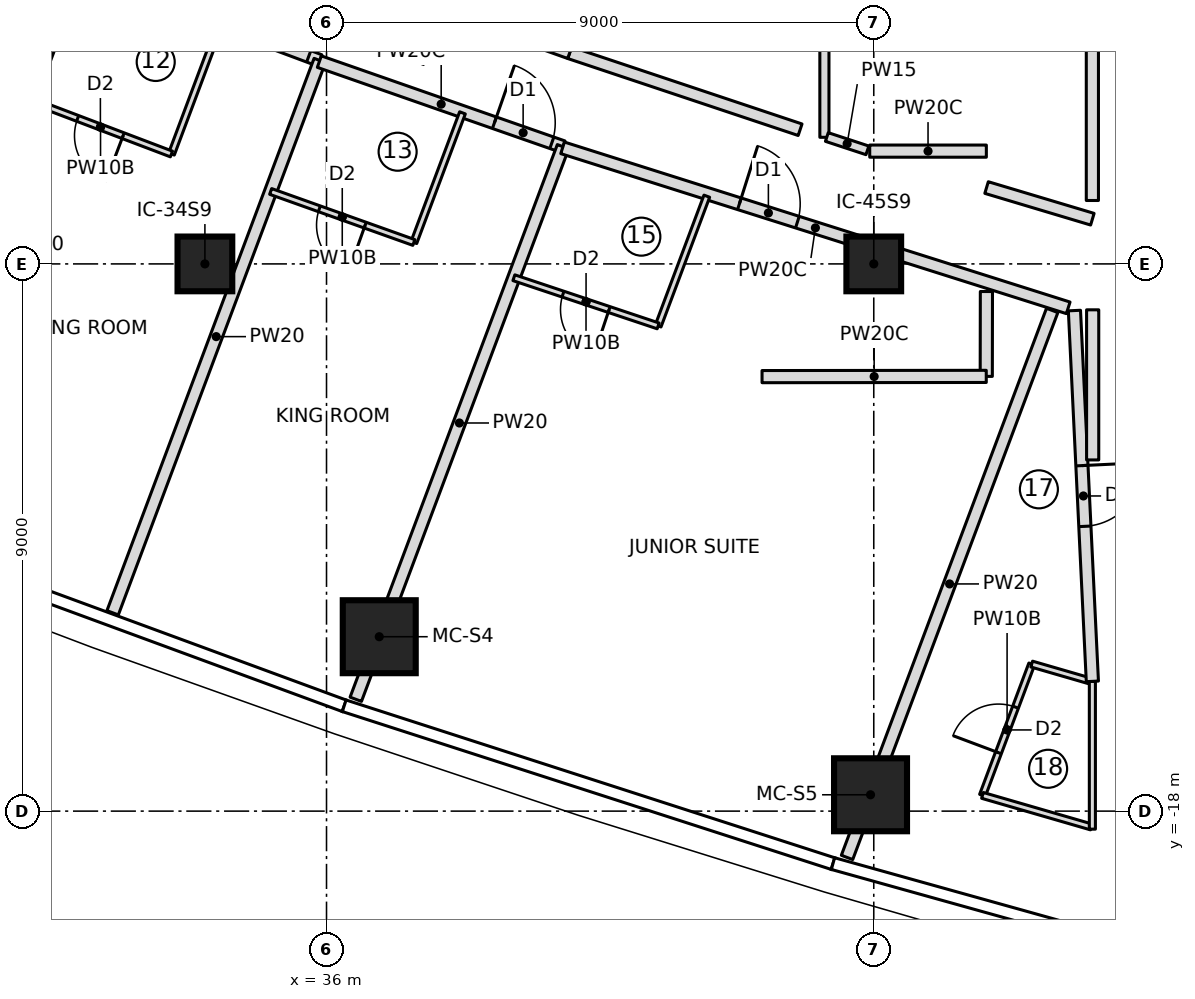
"""IFC4 building model, lengths in metres.
Left out: names, types, materials, properties, quantities, classifications, styles, units other than length and angle.
Written with IfcOpenShell. Run it as: python <this file> out.ifc"""

import sys

from ifc_helpers import new_model, si_unit, direction, frame, frame_2d, origin, origin_2d, place, context, subcontext, project, spatial, rectangle, extrude, element, fill, save


model = new_model("IFC4")
c1 = context("Model", 3, precision=1e-05, world=origin(), true_north=direction((0.0, 1.0)))
c2 = subcontext(c1, "Body", "Model", "MODEL_VIEW")
j1 = project(units=[si_unit("LENGTHUNIT", "METRE"), si_unit("PLANEANGLEUNIT", "RADIAN")], contexts=[c1])
p1 = place(None, origin())
s1 = spatial("IfcSite", under=j1, at=p1, CompositionType="ELEMENT")
p2 = place(p1, origin())
s2 = spatial("IfcBuilding", under=s1, at=p2, CompositionType="ELEMENT")
p3 = place(p2, frame((0.0, 0.0, 245.65)))
s3 = spatial("IfcBuildingStorey", under=s2, at=p3, CompositionType="ELEMENT", Elevation=245.65)
for number, where, z_axis, x_axis in (
    (1, (36.867, -15.132, 0.0), (0.0, 0.0, 1.0), (1.0, 0.0, 0.0)),
    (2, (44.947, -17.731, 0.0), (0.0, 0.0, 1.0), (1.0, 0.0, 0.0)),
):
    element("IfcColumn", number, at=place(p3, frame(where, z_axis=z_axis, x_axis=x_axis)), inside=s3, PredefinedType="COLUMN", context=c2, shape_type="SweptSolid", body=[
        extrude(rectangle(XDim=1.2, YDim=1.2, at=origin_2d()), origin(), (0.0, 0.0, 1.0), 3.55),
    ])
for number, where, z_axis, x_axis in (
    (3, (34.0, -9.0, 0.0), (0.0, 0.0, 1.0), (1.0, 0.0, 0.0)),
    (4, (45.0, -9.0, 0.0), (0.0, 0.0, 1.0), (1.0, 0.0, 0.0)),
):
    element("IfcColumn", number, at=place(p3, frame(where, z_axis=z_axis, x_axis=x_axis)), inside=s3, PredefinedType="COLUMN", context=c2, shape_type="SweptSolid", body=[
        extrude(rectangle(XDim=0.9, YDim=0.9, at=origin_2d()), origin(), (0.0, 0.0, 1.0), 3.55),
    ])
p4 = place(p3, frame((28.514, -13.235, 0.0), z_axis=(0.0, 0.0, 1.0), x_axis=(0.351126199585, 0.936328143316, 0.0)))
e5 = element("IfcWall", 5, at=p4, inside=s3, PredefinedType="PARTITIONING", context=c2, shape_type="SweptSolid", body=[
    extrude(rectangle(XDim=9.701, YDim=0.2, at=frame_2d((4.851, 0.0))), origin(), (0.0, 0.0, 1.0), 3.25),
])
p5 = place(p3, frame((31.913, -4.17, 0.0), z_axis=(0.0, 0.0, 1.0), x_axis=(0.936848300955, -0.349735987565, 0.0)))
e6 = element("IfcWall", 6, at=p5, inside=s3, PredefinedType="PARTITIONING", context=c2, shape_type="SweptSolid", body=[
    extrude(rectangle(XDim=4.244, YDim=0.2, at=frame_2d((2.122, 0.0))), origin(), (0.0, 0.0, 1.0), 3.25),
])
p6 = place(p5, frame((3.05, 0.0, 0.0)))
e7 = element("IfcOpeningElement", 7, at=p6, cuts=e6, PredefinedType="OPENING", context=c2, shape_type="SweptSolid", body=[
    extrude(rectangle(XDim=1.0, YDim=2.1, at=frame_2d((0.5, 1.05))), frame((0.0, 0.11, 0.0), z_axis=(0.0, -1.0, 0.0), x_axis=(1.0, 0.0, 0.0)), (0.0, 0.0, 1.0), 0.22),
])
p7 = place(p3, frame((34.25, -5.061, 0.0), z_axis=(0.0, 0.0, 1.0), x_axis=(-0.351135191353, -0.936324771323, 0.0)))
e8 = element("IfcWall", 8, at=p7, inside=s3, PredefinedType="PARTITIONING", context=c2, shape_type="SweptSolid", body=[
    extrude(rectangle(XDim=2.277, YDim=0.1, at=frame_2d((1.139, 0.0))), origin(), (0.0, 0.0, 1.0), 3.25),
])
p8 = place(p3, frame((33.45, -7.193, 0.0), z_axis=(0.0, 0.0, 1.0), x_axis=(-0.93495051617, 0.354778145202, 0.0)))
e9 = element("IfcWall", 9, at=p8, inside=s3, PredefinedType="PARTITIONING", context=c2, shape_type="SweptSolid", body=[
    extrude(rectangle(XDim=2.495, YDim=0.1, at=frame_2d((1.247, 0.0))), origin(), (0.0, 0.0, 1.0), 3.25),
])
p9 = place(p8, frame((0.85, 0.0, 0.0)))
e10 = element("IfcOpeningElement", 10, at=p9, cuts=e9, PredefinedType="OPENING", context=c2, shape_type="SweptSolid", body=[
    extrude(rectangle(XDim=0.8, YDim=2.1, at=frame_2d((0.4, 1.05))), frame((0.0, 0.06, 0.0), z_axis=(0.0, -1.0, 0.0), x_axis=(1.0, 0.0, 0.0)), (0.0, 0.0, 1.0), 0.12),
])
p10 = place(p3, frame((32.483, -14.738, 0.0), z_axis=(0.0, 0.0, 1.0), x_axis=(0.351117925717, 0.936331246002, 0.0)))
e11 = element("IfcWall", 11, at=p10, inside=s3, PredefinedType="PARTITIONING", context=c2, shape_type="SweptSolid", body=[
    extrude(rectangle(XDim=9.701, YDim=0.2, at=frame_2d((4.851, 0.0))), origin(), (0.0, 0.0, 1.0), 3.25),
])
p11 = place(p3, frame((35.882, -5.673, 0.0), z_axis=(0.0, 0.0, 1.0), x_axis=(0.944107376821, -0.329638075823, 0.0)))
e12 = element("IfcWall", 12, at=p11, inside=s3, PredefinedType="PARTITIONING", context=c2, shape_type="SweptSolid", body=[
    extrude(rectangle(XDim=4.245, YDim=0.2, at=frame_2d((2.122, 0.0))), origin(), (0.0, 0.0, 1.0), 3.25),
])
p12 = place(p11, frame((3.05, 0.0, 0.0)))
e13 = element("IfcOpeningElement", 13, at=p12, cuts=e12, PredefinedType="OPENING", context=c2, shape_type="SweptSolid", body=[
    extrude(rectangle(XDim=1.0, YDim=2.1, at=frame_2d((0.5, 1.05))), frame((0.0, 0.11, 0.0), z_axis=(0.0, -1.0, 0.0), x_axis=(1.0, 0.0, 0.0)), (0.0, 0.0, 1.0), 0.22),
])
p13 = place(p3, frame((38.236, -6.516, 0.0), z_axis=(0.0, 0.0, 1.0), x_axis=(-0.351229183496, -0.936289517543, 0.0)))
e14 = element("IfcWall", 14, at=p13, inside=s3, PredefinedType="PARTITIONING", context=c2, shape_type="SweptSolid", body=[
    extrude(rectangle(XDim=2.277, YDim=0.1, at=frame_2d((1.139, 0.0))), origin(), (0.0, 0.0, 1.0), 3.25),
])
p14 = place(p3, frame((37.436, -8.648, 0.0), z_axis=(0.0, 0.0, 1.0), x_axis=(-0.941896455552, 0.335903359641, 0.0)))
e15 = element("IfcWall", 15, at=p14, inside=s3, PredefinedType="PARTITIONING", context=c2, shape_type="SweptSolid", body=[
    extrude(rectangle(XDim=2.5, YDim=0.1, at=frame_2d((1.25, 0.0))), origin(), (0.0, 0.0, 1.0), 3.25),
])
p15 = place(p14, frame((0.85, 0.0, 0.0)))
e16 = element("IfcOpeningElement", 16, at=p15, cuts=e15, PredefinedType="OPENING", context=c2, shape_type="SweptSolid", body=[
    extrude(rectangle(XDim=0.8, YDim=2.1, at=frame_2d((0.4, 1.05))), frame((0.0, 0.06, 0.0), z_axis=(0.0, -1.0, 0.0), x_axis=(1.0, 0.0, 0.0)), (0.0, 0.0, 1.0), 0.12),
])
p16 = place(p3, frame((36.481, -16.161, 0.0), z_axis=(0.0, 0.0, 1.0), x_axis=(0.35112895446, 0.936327110224, 0.0)))
e17 = element("IfcWall", 17, at=p16, inside=s3, PredefinedType="PARTITIONING", context=c2, shape_type="SweptSolid", body=[
    extrude(rectangle(XDim=9.706, YDim=0.2, at=frame_2d((4.853, 0.0))), origin(), (0.0, 0.0, 1.0), 3.25),
])
p17 = place(p3, frame((39.882, -7.091, 0.0), z_axis=(0.0, 0.0, 1.0), x_axis=(0.953395918068, -0.301722096326, 0.0)))
e18 = element("IfcWall", 18, at=p17, inside=s3, PredefinedType="PARTITIONING", context=c2, shape_type="SweptSolid", body=[
    extrude(rectangle(XDim=8.722, YDim=0.2, at=frame_2d((4.361, 0.0))), origin(), (0.0, 0.0, 1.0), 3.25),
])
p18 = place(p17, frame((3.05, 0.0, 0.0)))
e19 = element("IfcOpeningElement", 19, at=p18, cuts=e18, PredefinedType="OPENING", context=c2, shape_type="SweptSolid", body=[
    extrude(rectangle(XDim=1.0, YDim=2.1, at=frame_2d((0.5, 1.05))), frame((0.0, 0.11, 0.0), z_axis=(0.0, -1.0, 0.0), x_axis=(1.0, 0.0, 0.0)), (0.0, 0.0, 1.0), 0.22),
])
p19 = place(p3, frame((42.254, -7.886, 0.0), z_axis=(0.0, 0.0, 1.0), x_axis=(-0.351111699725, -0.936333580684, 0.0)))
e20 = element("IfcWall", 20, at=p19, inside=s3, PredefinedType="PARTITIONING", context=c2, shape_type="SweptSolid", body=[
    extrude(rectangle(XDim=2.279, YDim=0.1, at=frame_2d((1.139, 0.0))), origin(), (0.0, 0.0, 1.0), 3.25),
])
p20 = place(p3, frame((41.454, -10.02, 0.0), z_axis=(0.0, 0.0, 1.0), x_axis=(-0.948497709953, 0.316783986676, 0.0)))
e21 = element("IfcWall", 21, at=p20, inside=s3, PredefinedType="PARTITIONING", context=c2, shape_type="SweptSolid", body=[
    extrude(rectangle(XDim=2.502, YDim=0.1, at=frame_2d((1.251, 0.0))), origin(), (0.0, 0.0, 1.0), 3.25),
])
p21 = place(p20, frame((0.85, 0.0, 0.0)))
e22 = element("IfcOpeningElement", 22, at=p21, cuts=e21, PredefinedType="OPENING", context=c2, shape_type="SweptSolid", body=[
    extrude(rectangle(XDim=0.8, YDim=2.1, at=frame_2d((0.4, 1.05))), frame((0.0, 0.06, 0.0), z_axis=(0.0, -1.0, 0.0), x_axis=(1.0, 0.0, 0.0)), (0.0, 0.0, 1.0), 0.12),
])
p22 = place(p3, frame((44.56, -18.762, 0.0), z_axis=(0.0, 0.0, 1.0), x_axis=(0.35112901071, 0.936327089129, 0.0)))
e23 = element("IfcWall", 23, at=p22, inside=s3, PredefinedType="PARTITIONING", context=c2, shape_type="SweptSolid", body=[
    extrude(rectangle(XDim=9.608, YDim=0.2, at=frame_2d((4.804, 0.0))), origin(), (0.0, 0.0, 1.0), 3.25),
])
p23 = place(p3, frame((46.788, -17.741, 0.0), z_axis=(0.0, 0.0, 1.0), x_axis=(0.351158236187, 0.936316128857, 0.0)))
e24 = element("IfcWall", 24, at=p23, inside=s3, PredefinedType="PARTITIONING", context=c2, shape_type="SweptSolid", body=[
    extrude(rectangle(XDim=2.307, YDim=0.1, at=frame_2d((1.153, 0.0))), origin(), (0.0, 0.0, 1.0), 3.25),
])
p24 = place(p23, frame((0.75, 0.0, 0.0)))
e25 = element("IfcOpeningElement", 25, at=p24, cuts=e24, PredefinedType="OPENING", context=c2, shape_type="SweptSolid", body=[
    extrude(rectangle(XDim=0.8, YDim=2.1, at=frame_2d((0.4, 1.05))), frame((0.0, 0.06, 0.0), z_axis=(0.0, -1.0, 0.0), x_axis=(1.0, 0.0, 0.0)), (0.0, 0.0, 1.0), 0.12),
])
p25 = place(p3, frame((47.598, -15.582, 0.0), z_axis=(0.0, 0.0, 1.0), x_axis=(0.960468222897, -0.278389642057, 0.0)))
e26 = element("IfcWall", 26, at=p25, inside=s3, PredefinedType="PARTITIONING", context=c2, shape_type="SweptSolid", body=[
    extrude(rectangle(XDim=1.019, YDim=0.1, at=frame_2d((0.51, 0.0))), origin(), (0.0, 0.0, 1.0), 3.25),
])
p26 = place(p3, frame((48.578, -18.26, 0.0), z_axis=(0.0, 0.0, 1.0), x_axis=(-0.960473980386, 0.278369777458, 0.0)))
e27 = element("IfcWall", 27, at=p26, inside=s3, PredefinedType="PARTITIONING", context=c2, shape_type="SweptSolid", body=[
    extrude(rectangle(XDim=1.864, YDim=0.1, at=frame_2d((0.932, 0.0))), origin(), (0.0, 0.0, 1.0), 3.25),
])
p27 = place(p3, frame((43.788, -6.793, 0.0), z_axis=(0.0, 0.0, 1.0), x_axis=(-0.948469186567, 0.316869377084, 0.0)))
e28 = element("IfcWall", 28, at=p27, inside=s3, PredefinedType="PARTITIONING", context=c2, shape_type="SweptSolid", body=[
    extrude(rectangle(XDim=3.995, YDim=0.2, at=frame_2d((1.998, 0.0))), origin(), (0.0, 0.0, 1.0), 3.25),
])
p28 = place(p3, frame((39.999, -5.527, 0.0), z_axis=(0.0, 0.0, 1.0), x_axis=(-0.941922306529, 0.33583086288, 0.0)))
e29 = element("IfcWall", 29, at=p28, inside=s3, PredefinedType="PARTITIONING", context=c2, shape_type="SweptSolid", body=[
    extrude(rectangle(XDim=1.407, YDim=0.2, at=frame_2d((0.704, 0.0))), origin(), (0.0, 0.0, 1.0), 3.25),
])
p29 = place(p3, frame((44.188, -6.918, 0.0), z_axis=(0.0, 0.0, 1.0), x_axis=(0.0, 1.0, 0.0)))
e30 = element("IfcWall", 30, at=p29, inside=s3, PredefinedType="PARTITIONING", context=c2, shape_type="SweptSolid", body=[
    extrude(rectangle(XDim=13.731, YDim=0.15, at=frame_2d((6.866, 0.0))), origin(), (0.0, 0.0, 1.0), 3.25),
])
p30 = place(p3, frame((48.595, -15.866, 0.0), z_axis=(0.0, 0.0, 1.0), x_axis=(0.0, -1.0, 0.0)))
e31 = element("IfcWall", 31, at=p30, inside=s3, PredefinedType="PARTITIONING", context=c2, shape_type="SweptSolid", body=[
    extrude(rectangle(XDim=2.431, YDim=0.1, at=frame_2d((1.215, 0.0))), origin(), (0.0, 0.0, 1.0), 3.25),
])
p31 = place(p3, frame((48.595, 7.957, 0.0), z_axis=(0.0, 0.0, 1.0), x_axis=(0.0, -1.0, 0.0)))
e32 = element("IfcWall", 32, at=p31, inside=s3, PredefinedType="PARTITIONING", context=c2, shape_type="SweptSolid", body=[
    extrude(rectangle(XDim=15.914, YDim=0.2, at=frame_2d((7.957, 0.0))), origin(), (0.0, 0.0, 1.0), 3.25),
])
p32 = place(p31, frame((7.457, 0.0, 0.0)))
e33 = element("IfcOpeningElement", 33, at=p32, cuts=e32, PredefinedType="OPENING", context=c2, shape_type="SweptSolid", body=[
    extrude(rectangle(XDim=1.0, YDim=2.1, at=frame_2d((0.5, 1.05))), frame((0.0, 0.11, 0.0), z_axis=(0.0, -1.0, 0.0), x_axis=(1.0, 0.0, 0.0)), (0.0, 0.0, 1.0), 0.22),
])
p33 = place(p3, frame((48.3, -9.767, 0.0), z_axis=(0.0, 0.0, 1.0), x_axis=(0.048302241024, -0.998832765538, 0.0)))
e34 = element("IfcWall", 34, at=p33, inside=s3, PredefinedType="PARTITIONING", context=c2, shape_type="SweptSolid", body=[
    extrude(rectangle(XDim=6.106, YDim=0.2, at=frame_2d((3.053, 0.0))), origin(), (0.0, 0.0, 1.0), 3.25),
])
p34 = place(p33, frame((2.553, 0.0, 0.0)))
e35 = element("IfcOpeningElement", 35, at=p34, cuts=e34, PredefinedType="OPENING", context=c2, shape_type="SweptSolid", body=[
    extrude(rectangle(XDim=1.0, YDim=2.1, at=frame_2d((0.5, 1.05))), frame((0.0, 0.11, 0.0), z_axis=(0.0, -1.0, 0.0), x_axis=(1.0, 0.0, 0.0)), (0.0, 0.0, 1.0), 0.22),
])
p35 = place(p3, frame((48.595, -8.265, 0.0), z_axis=(0.0, 0.0, 1.0), x_axis=(-0.958014760688, 0.286718883759, 0.0)))
e36 = element("IfcWall", 36, at=p35, inside=s3, PredefinedType="PARTITIONING", context=c2, shape_type="SweptSolid", body=[
    extrude(rectangle(XDim=1.816, YDim=0.2, at=frame_2d((0.908, 0.0))), origin(), (0.0, 0.0, 1.0), 3.25),
])
p36 = place(p3, frame((46.852, -7.145, 0.0), z_axis=(0.0, 0.0, 1.0), x_axis=(-0.999999991898, 0.000127291241, 0.0)))
e37 = element("IfcWall", 37, at=p36, inside=s3, PredefinedType="PARTITIONING", context=c2, shape_type="SweptSolid", body=[
    extrude(rectangle(XDim=1.918, YDim=0.2, at=frame_2d((0.959, 0.0))), origin(), (0.0, 0.0, 1.0), 3.25),
])
p37 = place(p3, frame((44.896, -7.133, 0.0), z_axis=(0.0, 0.0, 1.0), x_axis=(-0.94982393739, 0.312785050732, 0.0)))
e38 = element("IfcWall", 38, at=p37, inside=s3, PredefinedType="PARTITIONING", context=c2, shape_type="SweptSolid", body=[
    extrude(rectangle(XDim=0.702, YDim=0.15, at=frame_2d((0.351, 0.0))), origin(), (0.0, 0.0, 1.0), 3.25),
])
p38 = place(p3, frame((46.853, -9.454, 0.0), z_axis=(0.0, 0.0, 1.0), x_axis=(-0.001748860564, -0.999998470742, 0.0)))
e39 = element("IfcWall", 39, at=p38, inside=s3, PredefinedType="PARTITIONING", context=c2, shape_type="SweptSolid", body=[
    extrude(rectangle(XDim=1.396, YDim=0.2, at=frame_2d((0.698, 0.0))), origin(), (0.0, 0.0, 1.0), 3.25),
])
p39 = place(p3, frame((46.85, -10.85, 0.0), z_axis=(0.0, 0.0, 1.0), x_axis=(-0.999999438919, -0.00105932144, 0.0)))
e40 = element("IfcWall", 40, at=p39, inside=s3, PredefinedType="PARTITIONING", context=c2, shape_type="SweptSolid", body=[
    extrude(rectangle(XDim=3.688, YDim=0.2, at=frame_2d((1.844, 0.0))), origin(), (0.0, 0.0, 1.0), 3.25),
])
p40 = place(p3, frame((48.6, -12.224, 0.0), z_axis=(0.0, 0.0, 1.0), x_axis=(0.0, 1.0, 0.0)))
e41 = element("IfcWall", 41, at=p40, inside=s3, PredefinedType="PARTITIONING", context=c2, shape_type="SweptSolid", body=[
    extrude(rectangle(XDim=2.469, YDim=0.2, at=frame_2d((1.234, 0.0))), origin(), (0.0, 0.0, 1.0), 3.25),
])
p41 = place(p9, origin())
e42 = element("IfcDoor", 42, at=p41, inside=s3, OperationType="SINGLE_SWING_LEFT", PredefinedType="DOOR", context=c2, shape_type="SweptSolid", body=[
    extrude(rectangle(XDim=0.8, YDim=2.1, at=frame_2d((0.4, 1.05))), frame((0.0, 0.025, 0.0), z_axis=(0.0, -1.0, 0.0), x_axis=(1.0, 0.0, 0.0)), (0.0, 0.0, 1.0), 0.05),
])
fill(e10, e42)
p42 = place(p6, origin())
e43 = element("IfcDoor", 43, at=p42, inside=s3, OperationType="SINGLE_SWING_LEFT", PredefinedType="DOOR", context=c2, shape_type="SweptSolid", body=[
    extrude(rectangle(XDim=1.0, YDim=2.1, at=frame_2d((0.5, 1.05))), frame((0.0, 0.025, 0.0), z_axis=(0.0, -1.0, 0.0), x_axis=(1.0, 0.0, 0.0)), (0.0, 0.0, 1.0), 0.05),
])
fill(e7, e43)
p43 = place(p15, origin())
e44 = element("IfcDoor", 44, at=p43, inside=s3, OperationType="SINGLE_SWING_LEFT", PredefinedType="DOOR", context=c2, shape_type="SweptSolid", body=[
    extrude(rectangle(XDim=0.8, YDim=2.1, at=frame_2d((0.4, 1.05))), frame((0.0, 0.025, 0.0), z_axis=(0.0, -1.0, 0.0), x_axis=(1.0, 0.0, 0.0)), (0.0, 0.0, 1.0), 0.05),
])
fill(e16, e44)
p44 = place(p12, origin())
e45 = element("IfcDoor", 45, at=p44, inside=s3, OperationType="SINGLE_SWING_LEFT", PredefinedType="DOOR", context=c2, shape_type="SweptSolid", body=[
    extrude(rectangle(XDim=1.0, YDim=2.1, at=frame_2d((0.5, 1.05))), frame((0.0, 0.025, 0.0), z_axis=(0.0, -1.0, 0.0), x_axis=(1.0, 0.0, 0.0)), (0.0, 0.0, 1.0), 0.05),
])
fill(e13, e45)
p45 = place(p21, origin())
e46 = element("IfcDoor", 46, at=p45, inside=s3, OperationType="SINGLE_SWING_LEFT", PredefinedType="DOOR", context=c2, shape_type="SweptSolid", body=[
    extrude(rectangle(XDim=0.8, YDim=2.1, at=frame_2d((0.4, 1.05))), frame((0.0, 0.025, 0.0), z_axis=(0.0, -1.0, 0.0), x_axis=(1.0, 0.0, 0.0)), (0.0, 0.0, 1.0), 0.05),
])
fill(e22, e46)
p46 = place(p18, origin())
e47 = element("IfcDoor", 47, at=p46, inside=s3, OperationType="SINGLE_SWING_LEFT", PredefinedType="DOOR", context=c2, shape_type="SweptSolid", body=[
    extrude(rectangle(XDim=1.0, YDim=2.1, at=frame_2d((0.5, 1.05))), frame((0.0, 0.025, 0.0), z_axis=(0.0, -1.0, 0.0), x_axis=(1.0, 0.0, 0.0)), (0.0, 0.0, 1.0), 0.05),
])
fill(e19, e47)
p47 = place(p24, origin())
e48 = element("IfcDoor", 48, at=p47, inside=s3, OperationType="SINGLE_SWING_LEFT", PredefinedType="DOOR", context=c2, shape_type="SweptSolid", body=[
    extrude(rectangle(XDim=0.8, YDim=2.1, at=frame_2d((0.4, 1.05))), frame((0.0, 0.025, 0.0), z_axis=(0.0, -1.0, 0.0), x_axis=(1.0, 0.0, 0.0)), (0.0, 0.0, 1.0), 0.05),
])
fill(e25, e48)
p48 = place(p34, origin())
e49 = element("IfcDoor", 49, at=p48, inside=s3, OperationType="SINGLE_SWING_RIGHT", PredefinedType="DOOR", context=c2, shape_type="SweptSolid", body=[
    extrude(rectangle(XDim=1.0, YDim=2.1, at=frame_2d((0.5, 1.05))), frame((0.0, 0.025, 0.0), z_axis=(0.0, -1.0, 0.0), x_axis=(1.0, 0.0, 0.0)), (0.0, 0.0, 1.0), 0.05),
])
fill(e35, e49)
save(model, sys.argv[1])
